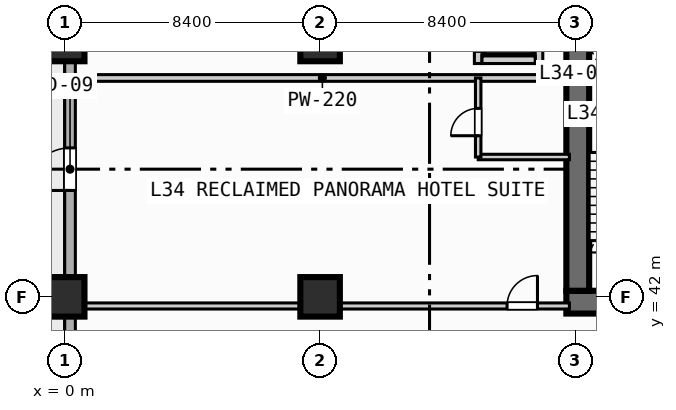
"""IFC4 building model, lengths in metres.
Left out: names, types, materials, properties, quantities, classifications, styles, units other than length and angle.
Written with IfcOpenShell. Run it as: python <this file> out.ifc"""

import sys

from ifc_helpers import new_model, si_unit, direction, frame, frame_2d, origin, origin_2d, place, context, subcontext, project, spatial, rectangle, extrude, element, fill, save


model = new_model("IFC4")
c1 = context("Model", 3, precision=1e-05, world=origin(), true_north=direction((0.0, 1.0)))
c2 = subcontext(c1, "Body", "Model", "MODEL_VIEW")
j1 = project(units=[si_unit("LENGTHUNIT", "METRE"), si_unit("PLANEANGLEUNIT", "RADIAN")], contexts=[c1])
p1 = place(None, origin())
s1 = spatial("IfcSite", under=j1, at=p1, CompositionType="ELEMENT")
p2 = place(p1, origin())
s2 = spatial("IfcBuilding", under=s1, at=p2, CompositionType="ELEMENT")
p3 = place(p2, frame((0.0, 0.0, 141.8)))
s3 = spatial("IfcBuildingStorey", under=s2, at=p3, CompositionType="ELEMENT", Elevation=141.8)
p4 = place(p3, frame((16.5, 41.825, 0.0), z_axis=(0.0, 0.0, 1.0), x_axis=(1.0, 0.0, 0.0)))
e1 = element("IfcWall", 1, at=p4, inside=s3, PredefinedType="SHEAR", context=c2, shape_type="SweptSolid", body=[
    extrude(rectangle(XDim=1.5, YDim=0.75, at=frame_2d((0.75, 0.0))), origin(), (0.0, 0.0, 1.0), 3.55),
])
p5 = place(p3, frame((16.875, 42.2, 0.0), z_axis=(0.0, 0.0, 1.0), x_axis=(0.0, 1.0, 0.0)))
e2 = element("IfcWall", 2, at=p5, inside=s3, PredefinedType="SHEAR", context=c2, shape_type="SweptSolid", body=[
    extrude(rectangle(XDim=16.35, YDim=0.75, at=frame_2d((8.175, 0.0))), origin(), (0.0, 0.0, 1.0), 3.55),
])
for number, where, z_axis, x_axis in (
    (3, (0.0, 42.0, 0.0), (0.0, 0.0, 1.0), (1.0, 0.0, 0.0)),
    (4, (0.0, 50.4, 0.0), (0.0, 0.0, 1.0), (1.0, 0.0, 0.0)),
    (5, (8.4, 42.0, 0.0), (0.0, 0.0, 1.0), (1.0, 0.0, 0.0)),
    (6, (8.4, 50.4, 0.0), (0.0, 0.0, 1.0), (1.0, 0.0, 0.0)),
):
    element("IfcColumn", number, at=place(p3, frame(where, z_axis=z_axis, x_axis=x_axis)), inside=s3, PredefinedType="COLUMN", context=c2, shape_type="SweptSolid", body=[
        extrude(rectangle(XDim=1.3, YDim=1.3, at=origin_2d()), origin(), (0.0, 0.0, 1.0), 3.8),
    ])
p6 = place(p3, frame((0.175, 3.175, 0.0), z_axis=(0.0, 0.0, 1.0), x_axis=(0.0, 1.0, 0.0)))
e7 = element("IfcWall", 7, at=p6, inside=s3, PredefinedType="STANDARD", context=c2, shape_type="SweptSolid", body=[
    extrude(rectangle(XDim=86.05, YDim=0.35, at=frame_2d((43.025, 0.0))), origin(), (0.0, 0.0, 1.0), 3.55),
])
p7 = place(p6, frame((42.325, 0.0, 0.0)))
e8 = element("IfcOpeningElement", 8, at=p7, cuts=e7, PredefinedType="OPENING", context=c2, shape_type="SweptSolid", body=[
    extrude(rectangle(XDim=1.4, YDim=2.2, at=frame_2d((0.7, 1.1))), frame((0.0, 0.185, 0.0), z_axis=(0.0, -1.0, 0.0), x_axis=(1.0, 0.0, 0.0)), (0.0, 0.0, 1.0), 0.37),
])
p8 = place(p6, frame((25.125, 0.0, 0.85)))
e9 = element("IfcOpeningElement", 9, at=p8, cuts=e7, PredefinedType="OPENING", context=c2, shape_type="SweptSolid", body=[
    extrude(rectangle(XDim=2.2, YDim=1.8, at=frame_2d((1.1, 0.9))), frame((0.0, 0.185, 0.0), z_axis=(0.0, -1.0, 0.0), x_axis=(1.0, 0.0, 0.0)), (0.0, 0.0, 1.0), 0.37),
])
p9 = place(p6, frame((33.525, 0.0, 0.85)))
e10 = element("IfcOpeningElement", 10, at=p9, cuts=e7, PredefinedType="OPENING", context=c2, shape_type="SweptSolid", body=[
    extrude(rectangle(XDim=2.2, YDim=1.8, at=frame_2d((1.1, 0.9))), frame((0.0, 0.185, 0.0), z_axis=(0.0, -1.0, 0.0), x_axis=(1.0, 0.0, 0.0)), (0.0, 0.0, 1.0), 0.37),
])
p10 = place(p3, frame((13.6, 49.675, 0.0), z_axis=(0.0, 0.0, 1.0), x_axis=(0.0, 1.0, 0.0)))
e11 = element("IfcWall", 11, at=p10, inside=s3, PredefinedType="SOLIDWALL", context=c2, shape_type="SweptSolid", body=[
    extrude(rectangle(XDim=2.75, YDim=0.25, at=frame_2d((1.375, 0.0))), origin(), (0.0, 0.0, 1.0), 3.55),
])
p11 = place(p10, frame((0.4, 0.0, 0.0)))
e12 = element("IfcOpeningElement", 12, at=p11, cuts=e11, PredefinedType="OPENING", context=c2, shape_type="SweptSolid", body=[
    extrude(rectangle(XDim=1.1, YDim=2.15, at=frame_2d((0.55, 1.075))), frame((0.0, 0.135, 0.0), z_axis=(0.0, -1.0, 0.0), x_axis=(1.0, 0.0, 0.0)), (0.0, 0.0, 1.0), 0.27),
])
p12 = place(p3, frame((15.6, 49.675, 0.0), z_axis=(0.0, 0.0, 1.0), x_axis=(0.0, 1.0, 0.0)))
e13 = element("IfcWall", 13, at=p12, inside=s3, PredefinedType="SOLIDWALL", context=c2, shape_type="SweptSolid", body=[
    extrude(rectangle(XDim=2.75, YDim=0.25, at=frame_2d((1.375, 0.0))), origin(), (0.0, 0.0, 1.0), 3.55),
])
p13 = place(p3, frame((13.725, 49.8, 0.0), z_axis=(0.0, 0.0, 1.0), x_axis=(1.0, 0.0, 0.0)))
e14 = element("IfcWall", 14, at=p13, inside=s3, PredefinedType="SOLIDWALL", context=c2, shape_type="SweptSolid", body=[
    extrude(rectangle(XDim=1.75, YDim=0.25, at=frame_2d((0.875, 0.0))), origin(), (0.0, 0.0, 1.0), 3.55),
])
p14 = place(p3, frame((0.35, 41.7, 0.0), z_axis=(0.0, 0.0, 1.0), x_axis=(1.0, 0.0, 0.0)))
e15 = element("IfcWall", 15, at=p14, inside=s3, PredefinedType="PARTITIONING", context=c2, shape_type="SweptSolid", body=[
    extrude(rectangle(XDim=16.25, YDim=0.2, at=frame_2d((8.125, 0.0))), origin(), (0.0, 0.0, 1.0), 2.8),
])
p15 = place(p14, frame((14.2, 0.0, 0.0)))
e16 = element("IfcOpeningElement", 16, at=p15, cuts=e15, PredefinedType="OPENING", context=c2, shape_type="SweptSolid", body=[
    extrude(rectangle(XDim=1.0, YDim=2.15, at=frame_2d((0.5, 1.075))), frame((0.0, 0.11, 0.0), z_axis=(0.0, -1.0, 0.0), x_axis=(1.0, 0.0, 0.0)), (0.0, 0.0, 1.0), 0.22),
])
p16 = place(p3, frame((0.35, 49.2, 0.0), z_axis=(0.0, 0.0, 1.0), x_axis=(1.0, 0.0, 0.0)))
e17 = element("IfcWall", 17, at=p16, inside=s3, PredefinedType="PARTITIONING", context=c2, shape_type="SweptSolid", body=[
    extrude(rectangle(XDim=16.25, YDim=0.22, at=frame_2d((8.125, 0.0))), origin(), (0.0, 0.0, 1.0), 3.55),
])
p17 = place(p3, frame((13.6, 46.6, 0.0), z_axis=(0.0, 0.0, 1.0), x_axis=(1.0, 0.0, 0.0)))
e18 = element("IfcWall", 18, at=p17, inside=s3, PredefinedType="PLUMBINGWALL", context=c2, shape_type="SweptSolid", body=[
    extrude(rectangle(XDim=3.0, YDim=0.18, at=frame_2d((1.5, 0.0))), origin(), (0.0, 0.0, 1.0), 3.55),
])
p18 = place(p3, frame((13.6, 46.6, 0.0), z_axis=(0.0, 0.0, 1.0), x_axis=(0.0, 1.0, 0.0)))
e19 = element("IfcWall", 19, at=p18, inside=s3, PredefinedType="PLUMBINGWALL", context=c2, shape_type="SweptSolid", body=[
    extrude(rectangle(XDim=2.6, YDim=0.18, at=frame_2d((1.3, 0.0))), origin(), (0.0, 0.0, 1.0), 3.55),
])
p19 = place(p18, frame((0.7, 0.0, 0.0)))
e20 = element("IfcOpeningElement", 20, at=p19, cuts=e19, PredefinedType="OPENING", context=c2, shape_type="SweptSolid", body=[
    extrude(rectangle(XDim=0.9, YDim=2.1, at=frame_2d((0.45, 1.05))), frame((0.0, 0.1, 0.0), z_axis=(0.0, -1.0, 0.0), x_axis=(1.0, 0.0, 0.0)), (0.0, 0.0, 1.0), 0.2),
])
p20 = place(p7, origin())
e21 = element("IfcDoor", 21, at=p20, inside=s3, OperationType="SINGLE_SWING_LEFT", PredefinedType="DOOR", context=c2, shape_type="SweptSolid", body=[
    extrude(rectangle(XDim=1.4, YDim=2.2, at=frame_2d((0.7, 1.1))), frame((0.0, 0.025, 0.0), z_axis=(0.0, -1.0, 0.0), x_axis=(1.0, 0.0, 0.0)), (0.0, 0.0, 1.0), 0.05),
])
fill(e8, e21)
p21 = place(p15, origin())
e22 = element("IfcDoor", 22, at=p21, inside=s3, OperationType="SINGLE_SWING_RIGHT", PredefinedType="DOOR", context=c2, shape_type="SweptSolid", body=[
    extrude(rectangle(XDim=1.0, YDim=2.15, at=frame_2d((0.5, 1.075))), frame((0.0, 0.025, 0.0), z_axis=(0.0, -1.0, 0.0), x_axis=(1.0, 0.0, 0.0)), (0.0, 0.0, 1.0), 0.05),
])
fill(e16, e22)
p22 = place(p19, origin())
e23 = element("IfcDoor", 23, at=p22, inside=s3, OperationType="SINGLE_SWING_LEFT", PredefinedType="DOOR", context=c2, shape_type="SweptSolid", body=[
    extrude(rectangle(XDim=0.9, YDim=2.1, at=frame_2d((0.45, 1.05))), frame((0.0, 0.025, 0.0), z_axis=(0.0, -1.0, 0.0), x_axis=(1.0, 0.0, 0.0)), (0.0, 0.0, 1.0), 0.05),
])
fill(e20, e23)
save(model, sys.argv[1])
